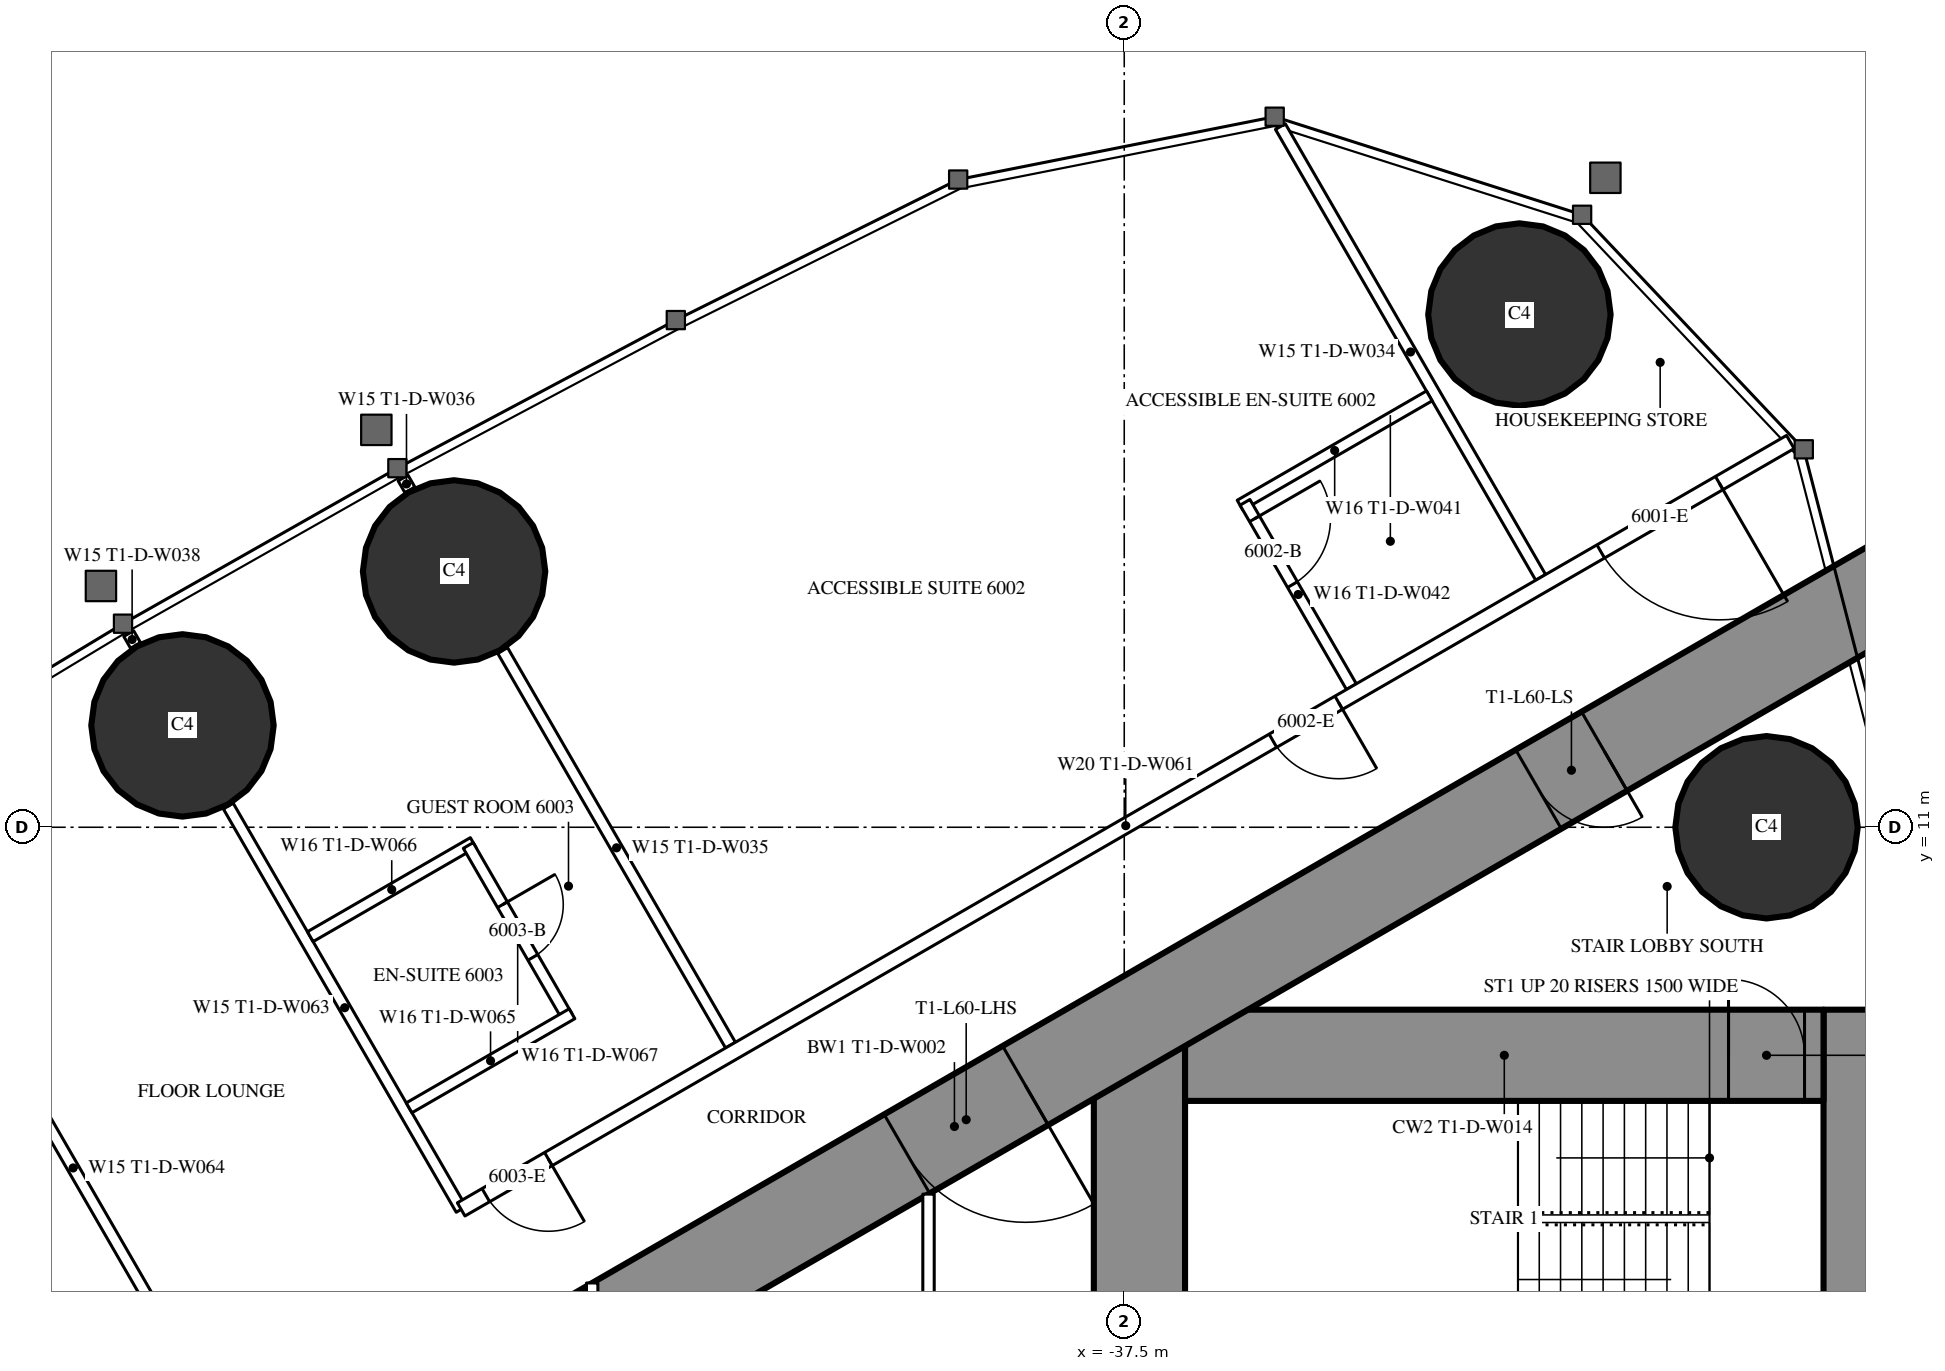
"""IFC4 building model, lengths in metres.
Left out: names, types, materials, properties, quantities, classifications, styles, units other than length and angle.
Written with IfcOpenShell. Run it as: python <this file> out.ifc"""

import sys

from ifc_helpers import new_model, si_unit, direction, frame, frame_2d, origin, origin_2d, place, context, subcontext, project, spatial, rectangle, circle, extrude, element, fill, save


model = new_model("IFC4")
c1 = context("Model", 3, precision=1e-05, world=origin(), true_north=direction((0.0, 1.0)))
c2 = subcontext(c1, "Body", "Model", "MODEL_VIEW")
j1 = project(units=[si_unit("LENGTHUNIT", "METRE"), si_unit("PLANEANGLEUNIT", "RADIAN")], contexts=[c1])
p1 = place(None, origin())
s1 = spatial("IfcSite", under=j1, at=p1, CompositionType="ELEMENT")
p2 = place(p1, origin())
s2 = spatial("IfcBuilding", under=s1, at=p2, CompositionType="ELEMENT")
p3 = place(p2, frame((0.0, 0.0, 226.1)))
s3 = spatial("IfcBuildingStorey", under=s2, at=p3, CompositionType="ELEMENT", Elevation=226.1)
for number, where, z_axis, x_axis in (
    (1, (-32.301, 17.745, 0.0), (0.0, 0.0, 1.0), (1.0, 0.0, 0.0)),
    (2, (-29.05, 11.0, 0.0), (0.0, 0.0, 1.0), (1.0, 0.0, 0.0)),
    (3, (-46.317, 14.365, 0.0), (0.0, 0.0, 1.0), (1.0, 0.0, 0.0)),
    (4, (-49.89, 12.34, 0.0), (0.0, 0.0, 1.0), (1.0, 0.0, 0.0)),
):
    element("IfcColumn", number, at=place(p3, frame(where, z_axis=z_axis, x_axis=x_axis)), inside=s3, PredefinedType="COLUMN", context=c2, shape_type="SweptSolid", body=[
        extrude(circle(Radius=1.2, at=origin_2d()), origin(), (0.0, 0.0, 1.0), 3.6),
    ])
p4 = place(p3, frame((-27.9, 8.6, 0.0), z_axis=(0.0, 0.0, 1.0), x_axis=(0.0, -1.0, 0.0)))
e5 = element("IfcWall", 5, at=p4, inside=s3, PredefinedType="SHEAR", context=c2, shape_type="SweptSolid", body=[
    extrude(rectangle(XDim=17.2, YDim=0.8, at=frame_2d((8.6, 0.0))), origin(), (0.0, 0.0, 1.0), 3.6),
])
p5 = place(p4, frame((6.95, 0.0, 0.0)))
e6 = element("IfcOpeningElement", 6, at=p5, cuts=e5, PredefinedType="OPENING", context=c2, shape_type="SweptSolid", body=[
    extrude(rectangle(XDim=0.9, YDim=2.2, at=frame_2d((0.45, 1.1))), frame((0.0, 0.41, 0.0), z_axis=(0.0, -1.0, 0.0), x_axis=(1.0, 0.0, 0.0)), (0.0, 0.0, 1.0), 0.82),
])
p6 = place(p3, frame((-37.3, 8.6, 0.0), z_axis=(0.0, 0.0, 1.0), x_axis=(0.0, -1.0, 0.0)))
e7 = element("IfcWall", 7, at=p6, inside=s3, PredefinedType="SHEAR", context=c2, shape_type="SweptSolid", body=[
    extrude(rectangle(XDim=17.2, YDim=1.2, at=frame_2d((8.6, 0.0))), origin(), (0.0, 0.0, 1.0), 3.6),
])
p7 = place(p6, frame((7.7, 0.0, 0.0)))
e8 = element("IfcOpeningElement", 8, at=p7, cuts=e7, PredefinedType="OPENING", context=c2, shape_type="SweptSolid", body=[
    extrude(rectangle(XDim=1.8, YDim=2.2, at=frame_2d((0.9, 1.1))), frame((0.0, 0.61, 0.0), z_axis=(0.0, -1.0, 0.0), x_axis=(1.0, 0.0, 0.0)), (0.0, 0.0, 1.0), 1.22),
])
p8 = place(p3, frame((-28.3, 8.0, 0.0), z_axis=(0.0, 0.0, 1.0), x_axis=(-1.0, 0.0, 0.0)))
e9 = element("IfcWall", 9, at=p8, inside=s3, PredefinedType="SHEAR", context=c2, shape_type="SweptSolid", body=[
    extrude(rectangle(XDim=8.4, YDim=1.2, at=frame_2d((4.2, 0.0))), origin(), (0.0, 0.0, 1.0), 3.6),
])
p9 = place(p8, frame((0.25, 0.0, 0.0)))
e10 = element("IfcOpeningElement", 10, at=p9, cuts=e9, PredefinedType="OPENING", context=c2, shape_type="SweptSolid", body=[
    extrude(rectangle(XDim=1.0, YDim=2.2, at=frame_2d((0.5, 1.1))), frame((0.0, 0.61, 0.0), z_axis=(0.0, -1.0, 0.0), x_axis=(1.0, 0.0, 0.0)), (0.0, 0.0, 1.0), 1.22),
])
p10 = place(p3, frame((-27.2, 14.3, 0.0), z_axis=(0.0, 0.0, 1.0), x_axis=(-0.866026593062, -0.499997940104, 0.0)))
e11 = element("IfcWall", 11, at=p10, inside=s3, PredefinedType="SHEAR", context=c2, shape_type="SweptSolid", body=[
    extrude(rectangle(XDim=28.946, YDim=1.2, at=frame_2d((14.473, 0.0))), origin(), (0.0, 0.0, 1.0), 3.6),
])
p11 = place(p10, frame((4.6, 0.0, 0.0)))
e12 = element("IfcOpeningElement", 12, at=p11, cuts=e11, PredefinedType="OPENING", context=c2, shape_type="SweptSolid", body=[
    extrude(rectangle(XDim=1.0, YDim=2.2, at=frame_2d((0.5, 1.1))), frame((0.0, 0.61, 0.0), z_axis=(0.0, -1.0, 0.0), x_axis=(1.0, 0.0, 0.0)), (0.0, 0.0, 1.0), 1.22),
])
p12 = place(p10, frame((13.395, 0.0, 0.0)))
e13 = element("IfcOpeningElement", 13, at=p12, cuts=e11, PredefinedType="OPENING", context=c2, shape_type="SweptSolid", body=[
    extrude(rectangle(XDim=1.8, YDim=2.2, at=frame_2d((0.9, 1.1))), frame((0.0, 0.61, 0.0), z_axis=(0.0, -1.0, 0.0), x_axis=(1.0, 0.0, 0.0)), (0.0, 0.0, 1.0), 1.22),
])
p13 = place(p3, frame((-32.022, 14.287, 0.0), z_axis=(0.0, 0.0, 1.0), x_axis=(-0.50000019414, 0.866025291697, 0.0)))
e14 = element("IfcWall", 14, at=p13, inside=s3, PredefinedType="PARTITIONING", context=c2, shape_type="SweptSolid", body=[
    extrude(rectangle(XDim=6.848, YDim=0.15, at=frame_2d((3.424, 0.0))), origin(), (0.0, 0.0, 1.0), 3.35),
])
p14 = place(p3, frame((-42.68, 8.134, 0.0), z_axis=(0.0, 0.0, 1.0), x_axis=(-0.499984479505, 0.866034364361, 0.0)))
e15 = element("IfcWall", 15, at=p14, inside=s3, PredefinedType="PARTITIONING", context=c2, shape_type="SweptSolid", body=[
    extrude(rectangle(XDim=5.995, YDim=0.15, at=frame_2d((2.998, 0.0))), origin(), (0.0, 0.0, 1.0), 2.45),
])
p15 = place(p3, frame((-46.898, 15.439, 0.0), z_axis=(0.0, 0.0, 1.0), x_axis=(-0.500232303069, 0.865891241997, 0.0)))
e16 = element("IfcWall", 16, at=p15, inside=s3, PredefinedType="PARTITIONING", context=c2, shape_type="SweptSolid", body=[
    extrude(rectangle(XDim=0.18, YDim=0.15, at=frame_2d((0.09, 0.0))), origin(), (0.0, 0.0, 1.0), 2.45),
])
p16 = place(p3, frame((-46.224, 5.972, 0.0), z_axis=(0.0, 0.0, 1.0), x_axis=(-0.500021351822, 0.866013075953, 0.0)))
e17 = element("IfcWall", 17, at=p16, inside=s3, PredefinedType="PARTITIONING", context=c2, shape_type="SweptSolid", body=[
    extrude(rectangle(XDim=6.128, YDim=0.15, at=frame_2d((3.064, 0.0))), origin(), (0.0, 0.0, 1.0), 2.45),
])
p17 = place(p3, frame((-50.508, 13.392, 0.0), z_axis=(0.0, 0.0, 1.0), x_axis=(-0.499644091975, 0.866230789891, 0.0)))
e18 = element("IfcWall", 18, at=p17, inside=s3, PredefinedType="PARTITIONING", context=c2, shape_type="SweptSolid", body=[
    extrude(rectangle(XDim=0.18, YDim=0.15, at=frame_2d((0.09, 0.0))), origin(), (0.0, 0.0, 1.0), 2.45),
])
p18 = place(p3, frame((-49.816, 3.898, 0.0), z_axis=(0.0, 0.0, 1.0), x_axis=(-0.500001913541, 0.866024298998, 0.0)))
e19 = element("IfcWall", 19, at=p18, inside=s3, PredefinedType="PARTITIONING", context=c2, shape_type="SweptSolid", body=[
    extrude(rectangle(XDim=6.05, YDim=0.15, at=frame_2d((3.025, 0.0))), origin(), (0.0, 0.0, 1.0), 2.45),
])
p19 = place(p3, frame((-33.487, 16.675, 0.0), z_axis=(0.0, 0.0, 1.0), x_axis=(-0.866039941686, -0.499974818771, 0.0)))
e20 = element("IfcWall", 20, at=p19, inside=s3, PredefinedType="PARTITIONING", context=c2, shape_type="SweptSolid", body=[
    extrude(rectangle(XDim=2.875, YDim=0.15, at=frame_2d((1.438, 0.0))), origin(), (0.0, 0.0, 1.0), 3.35),
])
p20 = place(p3, frame((-34.511, 12.85, 0.0), z_axis=(0.0, 0.0, 1.0), x_axis=(-0.500011755427, 0.866018616679, 0.0)))
e21 = element("IfcWall", 21, at=p20, inside=s3, PredefinedType="PARTITIONING", context=c2, shape_type="SweptSolid", body=[
    extrude(rectangle(XDim=2.8, YDim=0.15, at=frame_2d((1.4, 0.0))), origin(), (0.0, 0.0, 1.0), 3.35),
])
p21 = place(p20, frame((1.55, 0.0, 0.0)))
e22 = element("IfcOpeningElement", 22, at=p21, cuts=e21, PredefinedType="OPENING", context=c2, shape_type="SweptSolid", body=[
    extrude(rectangle(XDim=1.0, YDim=2.2, at=frame_2d((0.5, 1.1))), frame((0.0, 0.085, 0.0), z_axis=(0.0, -1.0, 0.0), x_axis=(1.0, 0.0, 0.0)), (0.0, 0.0, 1.0), 0.17),
])
p22 = place(p3, frame((-46.065, 10.798, 0.0), z_axis=(0.0, 0.0, 1.0), x_axis=(-0.866031185235, -0.4999899861, 0.0)))
e23 = element("IfcWall", 23, at=p22, inside=s3, PredefinedType="PARTITIONING", context=c2, shape_type="SweptSolid", body=[
    extrude(rectangle(XDim=2.475, YDim=0.15, at=frame_2d((1.238, 0.0))), origin(), (0.0, 0.0, 1.0), 3.35),
])
p23 = place(p3, frame((-44.83, 8.509, 0.0), z_axis=(0.0, 0.0, 1.0), x_axis=(-0.499936506574, 0.866062058628, 0.0)))
e24 = element("IfcWall", 24, at=p23, inside=s3, PredefinedType="PARTITIONING", context=c2, shape_type="SweptSolid", body=[
    extrude(rectangle(XDim=2.6, YDim=0.15, at=frame_2d((1.3, 0.0))), origin(), (0.0, 0.0, 1.0), 3.35),
])
p24 = place(p23, frame((0.9, 0.0, 0.0)))
e25 = element("IfcOpeningElement", 25, at=p24, cuts=e24, PredefinedType="OPENING", context=c2, shape_type="SweptSolid", body=[
    extrude(rectangle(XDim=0.8, YDim=2.2, at=frame_2d((0.4, 1.1))), frame((0.0, 0.085, 0.0), z_axis=(0.0, -1.0, 0.0), x_axis=(1.0, 0.0, 0.0)), (0.0, 0.0, 1.0), 0.17),
])
p25 = place(p3, frame((-44.765, 8.546, 0.0), z_axis=(0.0, 0.0, 1.0), x_axis=(-0.86604923931, -0.499958713387, 0.0)))
e26 = element("IfcWall", 26, at=p25, inside=s3, PredefinedType="PARTITIONING", context=c2, shape_type="SweptSolid", body=[
    extrude(rectangle(XDim=2.475, YDim=0.15, at=frame_2d((1.237, 0.0))), origin(), (0.0, 0.0, 1.0), 3.35),
])
p26 = place(p3, frame((-28.737, 16.068, 0.0), z_axis=(0.0, 0.0, 1.0), x_axis=(-0.866023901326, -0.500002602325, 0.0)))
e27 = element("IfcWall", 27, at=p26, inside=s3, PredefinedType="PARTITIONING", context=c2, shape_type="SweptSolid", body=[
    extrude(rectangle(XDim=20.192, YDim=0.2, at=frame_2d((10.096, 0.0))), origin(), (0.0, 0.0, 1.0), 3.35),
])
p27 = place(p26, frame((1.08, 0.0, 0.0)))
e28 = element("IfcOpeningElement", 28, at=p27, cuts=e27, PredefinedType="OPENING", context=c2, shape_type="SweptSolid", body=[
    extrude(rectangle(XDim=1.8, YDim=2.04, at=frame_2d((0.9, 1.02))), frame((0.0, 0.11, 0.0), z_axis=(0.0, -1.0, 0.0), x_axis=(1.0, 0.0, 0.0)), (0.0, 0.0, 1.0), 0.22),
])
p28 = place(p26, frame((6.86, 0.0, 0.0)))
e29 = element("IfcOpeningElement", 29, at=p28, cuts=e27, PredefinedType="OPENING", context=c2, shape_type="SweptSolid", body=[
    extrude(rectangle(XDim=1.0, YDim=2.2, at=frame_2d((0.5, 1.1))), frame((0.0, 0.11, 0.0), z_axis=(0.0, -1.0, 0.0), x_axis=(1.0, 0.0, 0.0)), (0.0, 0.0, 1.0), 0.22),
])
p29 = place(p26, frame((18.867, 0.0, 0.0)))
e30 = element("IfcOpeningElement", 30, at=p29, cuts=e27, PredefinedType="OPENING", context=c2, shape_type="SweptSolid", body=[
    extrude(rectangle(XDim=0.95, YDim=2.2, at=frame_2d((0.475, 1.1))), frame((0.0, 0.11, 0.0), z_axis=(0.0, -1.0, 0.0), x_axis=(1.0, 0.0, 0.0)), (0.0, 0.0, 1.0), 0.22),
])
p30 = place(p3, frame((-40.075, 6.174, 0.0), z_axis=(0.0, 0.0, 1.0), x_axis=(0.0, -1.0, 0.0)))
e31 = element("IfcWall", 31, at=p30, inside=s3, PredefinedType="PARTITIONING", context=c2, shape_type="SweptSolid", body=[
    extrude(rectangle(XDim=12.348, YDim=0.15, at=frame_2d((6.174, 0.0))), origin(), (0.0, 0.0, 1.0), 3.35),
])
p31 = place(p30, frame((5.274, 0.0, 0.0)))
e32 = element("IfcOpeningElement", 32, at=p31, cuts=e31, PredefinedType="OPENING", context=c2, shape_type="SweptSolid", body=[
    extrude(rectangle(XDim=1.8, YDim=2.2, at=frame_2d((0.9, 1.1))), frame((0.0, 0.085, 0.0), z_axis=(0.0, -1.0, 0.0), x_axis=(1.0, 0.0, 0.0)), (0.0, 0.0, 1.0), 0.17),
])
p32 = place(p3, frame((-44.5, 5.005, 0.0), z_axis=(0.0, 0.0, 1.0), x_axis=(0.0, -1.0, 0.0)))
e33 = element("IfcWall", 33, at=p32, inside=s3, PredefinedType="PARTITIONING", context=c2, shape_type="SweptSolid", body=[
    extrude(rectangle(XDim=10.009, YDim=0.15, at=frame_2d((5.005, 0.0))), origin(), (0.0, 0.0, 1.0), 2.5),
])
p33 = place(p32, frame((4.505, 0.0, 0.0)))
e34 = element("IfcOpeningElement", 34, at=p33, cuts=e33, PredefinedType="OPENING", context=c2, shape_type="SweptSolid", body=[
    extrude(rectangle(XDim=1.0, YDim=2.2, at=frame_2d((0.5, 1.1))), frame((0.0, 0.085, 0.0), z_axis=(0.0, -1.0, 0.0), x_axis=(1.0, 0.0, 0.0)), (0.0, 0.0, 1.0), 0.17),
])
p34 = place(p27, origin())
e35 = element("IfcDoor", 35, at=p34, inside=s3, OperationType="DOUBLE_DOOR_SINGLE_SWING", PredefinedType="DOOR", context=c2, shape_type="SweptSolid", body=[
    extrude(rectangle(XDim=1.8, YDim=2.04, at=frame_2d((0.9, 1.02))), frame((0.0, 0.025, 0.0), z_axis=(0.0, -1.0, 0.0), x_axis=(1.0, 0.0, 0.0)), (0.0, 0.0, 1.0), 0.05),
])
fill(e28, e35)
p35 = place(p21, origin())
e36 = element("IfcDoor", 36, at=p35, inside=s3, OperationType="SINGLE_SWING_RIGHT", PredefinedType="DOOR", context=c2, shape_type="SweptSolid", body=[
    extrude(rectangle(XDim=1.0, YDim=2.2, at=frame_2d((0.5, 1.1))), frame((0.0, 0.025, 0.0), z_axis=(0.0, -1.0, 0.0), x_axis=(1.0, 0.0, 0.0)), (0.0, 0.0, 1.0), 0.05),
])
fill(e22, e36)
p36 = place(p28, origin())
e37 = element("IfcDoor", 37, at=p36, inside=s3, OperationType="SINGLE_SWING_LEFT", PredefinedType="DOOR", context=c2, shape_type="SweptSolid", body=[
    extrude(rectangle(XDim=1.0, YDim=2.2, at=frame_2d((0.5, 1.1))), frame((0.0, 0.025, 0.0), z_axis=(0.0, -1.0, 0.0), x_axis=(1.0, 0.0, 0.0)), (0.0, 0.0, 1.0), 0.05),
])
fill(e29, e37)
p37 = place(p24, origin())
e38 = element("IfcDoor", 38, at=p37, inside=s3, OperationType="SINGLE_SWING_RIGHT", PredefinedType="DOOR", context=c2, shape_type="SweptSolid", body=[
    extrude(rectangle(XDim=0.8, YDim=2.2, at=frame_2d((0.4, 1.1))), frame((0.0, 0.025, 0.0), z_axis=(0.0, -1.0, 0.0), x_axis=(1.0, 0.0, 0.0)), (0.0, 0.0, 1.0), 0.05),
])
fill(e25, e38)
p38 = place(p29, origin())
e39 = element("IfcDoor", 39, at=p38, inside=s3, OperationType="SINGLE_SWING_LEFT", PredefinedType="DOOR", context=c2, shape_type="SweptSolid", body=[
    extrude(rectangle(XDim=0.95, YDim=2.2, at=frame_2d((0.475, 1.1))), frame((0.0, 0.025, 0.0), z_axis=(0.0, -1.0, 0.0), x_axis=(1.0, 0.0, 0.0)), (0.0, 0.0, 1.0), 0.05),
])
fill(e30, e39)
p39 = place(p11, origin())
e40 = element("IfcDoor", 40, at=p39, inside=s3, OperationType="SINGLE_SWING_LEFT", PredefinedType="DOOR", context=c2, shape_type="SweptSolid", body=[
    extrude(rectangle(XDim=1.0, YDim=2.2, at=frame_2d((0.5, 1.1))), frame((0.0, 0.025, 0.0), z_axis=(0.0, -1.0, 0.0), x_axis=(1.0, 0.0, 0.0)), (0.0, 0.0, 1.0), 0.05),
])
fill(e12, e40)
p40 = place(p12, origin())
e41 = element("IfcDoor", 41, at=p40, inside=s3, OperationType="DOUBLE_DOOR_SINGLE_SWING", PredefinedType="DOOR", context=c2, shape_type="SweptSolid", body=[
    extrude(rectangle(XDim=1.8, YDim=2.2, at=frame_2d((0.9, 1.1))), frame((0.0, 0.025, 0.0), z_axis=(0.0, -1.0, 0.0), x_axis=(1.0, 0.0, 0.0)), (0.0, 0.0, 1.0), 0.05),
])
fill(e13, e41)
p41 = place(p9, origin())
e42 = element("IfcDoor", 42, at=p41, inside=s3, OperationType="SINGLE_SWING_RIGHT", PredefinedType="DOOR", context=c2, shape_type="SweptSolid", body=[
    extrude(rectangle(XDim=1.0, YDim=2.2, at=frame_2d((0.5, 1.1))), frame((0.0, 0.025, 0.0), z_axis=(0.0, -1.0, 0.0), x_axis=(1.0, 0.0, 0.0)), (0.0, 0.0, 1.0), 0.05),
])
fill(e10, e42)
save(model, sys.argv[1])
